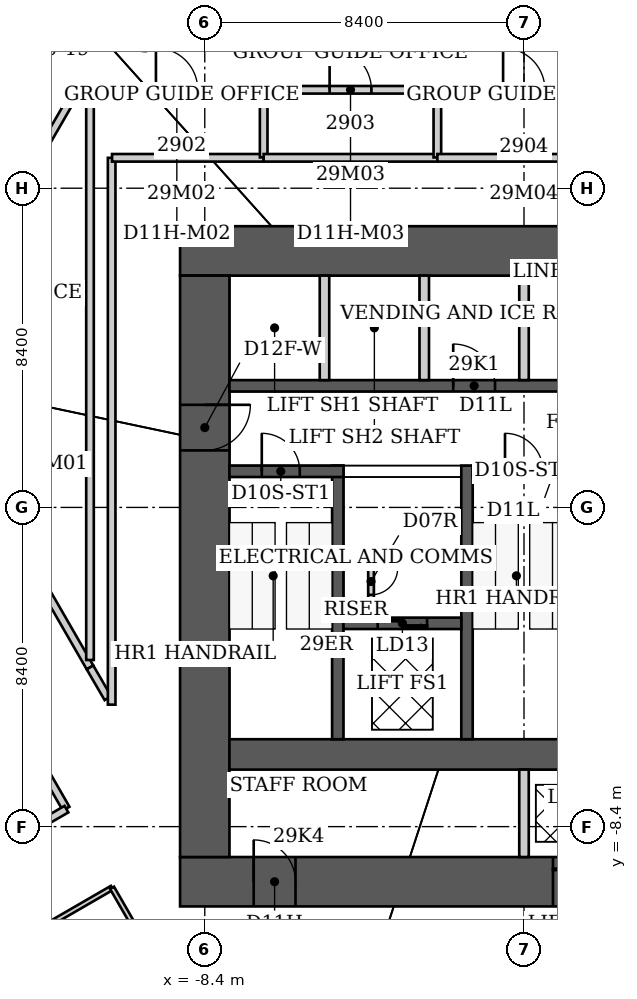
"""IFC4 building model, lengths in metres.
Left out: names, types, materials, properties, quantities, classifications, styles, units other than length and angle.
Written with IfcOpenShell. Run it as: python <this file> out.ifc"""

import sys

from ifc_helpers import new_model, si_unit, direction, frame, frame_2d, origin, place, context, subcontext, project, spatial, rectangle, extrude, element, fill, save


model = new_model("IFC4")
c1 = context("Model", 3, precision=1e-05, world=origin(), true_north=direction((0.0, 1.0)))
c2 = subcontext(c1, "Body", "Model", "MODEL_VIEW")
j1 = project(units=[si_unit("LENGTHUNIT", "METRE"), si_unit("PLANEANGLEUNIT", "RADIAN")], contexts=[c1])
p1 = place(None, origin())
s1 = spatial("IfcSite", under=j1, at=p1, CompositionType="ELEMENT")
p2 = place(p1, origin())
s2 = spatial("IfcBuilding", under=s1, at=p2, CompositionType="ELEMENT")
p3 = place(p2, frame((0.0, 0.0, 119.6)))
s3 = spatial("IfcBuildingStorey", under=s2, at=p3, CompositionType="ELEMENT", Elevation=119.6)
p4 = place(p3, frame((-9.05, 6.75, 0.0), z_axis=(0.0, 0.0, 1.0), x_axis=(1.0, 0.0, 0.0)))
e1 = element("IfcWall", 1, at=p4, inside=s3, PredefinedType="SHEAR", context=c2, shape_type="SweptSolid", body=[
    extrude(rectangle(XDim=18.1, YDim=1.3, at=frame_2d((9.05, 0.0))), origin(), (0.0, 0.0, 1.0), 3.8),
])
p5 = place(p3, frame((-9.05, -9.85, 0.0), z_axis=(0.0, 0.0, 1.0), x_axis=(1.0, 0.0, 0.0)))
e2 = element("IfcWall", 2, at=p5, inside=s3, PredefinedType="SHEAR", context=c2, shape_type="SweptSolid", body=[
    extrude(rectangle(XDim=18.1, YDim=1.3, at=frame_2d((9.05, 0.0))), origin(), (0.0, 0.0, 1.0), 3.8),
])
p6 = place(p5, frame((1.938, 0.0, 0.0)))
e3 = element("IfcOpeningElement", 3, at=p6, cuts=e2, PredefinedType="OPENING", context=c2, shape_type="SweptSolid", body=[
    extrude(rectangle(XDim=1.1, YDim=2.2, at=frame_2d((0.55, 1.1))), frame((0.0, 0.65, 0.0), z_axis=(0.0, -1.0, 0.0), x_axis=(1.0, 0.0, 0.0)), (0.0, 0.0, 1.0), 1.3),
])
p7 = place(p5, frame((9.812, 0.0, 0.0)))
e4 = element("IfcOpeningElement", 4, at=p7, cuts=e2, PredefinedType="OPENING", context=c2, shape_type="SweptSolid", body=[
    extrude(rectangle(XDim=1.1, YDim=2.1, at=frame_2d((0.55, 1.05))), frame((0.0, 0.65, 0.0), z_axis=(0.0, -1.0, 0.0), x_axis=(1.0, 0.0, 0.0)), (0.0, 0.0, 1.0), 1.3),
])
p8 = place(p5, frame((12.438, 0.0, 0.0)))
e5 = element("IfcOpeningElement", 5, at=p8, cuts=e2, PredefinedType="OPENING", context=c2, shape_type="SweptSolid", body=[
    extrude(rectangle(XDim=1.1, YDim=2.1, at=frame_2d((0.55, 1.05))), frame((0.0, 0.65, 0.0), z_axis=(0.0, -1.0, 0.0), x_axis=(1.0, 0.0, 0.0)), (0.0, 0.0, 1.0), 1.3),
])
p9 = place(p5, frame((15.062, 0.0, 0.0)))
e6 = element("IfcOpeningElement", 6, at=p9, cuts=e2, PredefinedType="OPENING", context=c2, shape_type="SweptSolid", body=[
    extrude(rectangle(XDim=1.1, YDim=2.1, at=frame_2d((0.55, 1.05))), frame((0.0, 0.65, 0.0), z_axis=(0.0, -1.0, 0.0), x_axis=(1.0, 0.0, 0.0)), (0.0, 0.0, 1.0), 1.3),
])
p10 = place(p3, frame((-8.4, -9.2, 0.0), z_axis=(0.0, 0.0, 1.0), x_axis=(0.0, 1.0, 0.0)))
e7 = element("IfcWall", 7, at=p10, inside=s3, PredefinedType="SHEAR", context=c2, shape_type="SweptSolid", body=[
    extrude(rectangle(XDim=15.3, YDim=1.3, at=frame_2d((7.65, 0.0))), origin(), (0.0, 0.0, 1.0), 3.8),
])
p11 = place(p10, frame((10.7, 0.0, 0.0)))
e8 = element("IfcOpeningElement", 8, at=p11, cuts=e7, PredefinedType="OPENING", context=c2, shape_type="SweptSolid", body=[
    extrude(rectangle(XDim=1.2, YDim=2.2, at=frame_2d((0.6, 1.1))), frame((0.0, 0.65, 0.0), z_axis=(0.0, -1.0, 0.0), x_axis=(1.0, 0.0, 0.0)), (0.0, 0.0, 1.0), 1.3),
])
p12 = place(p3, frame((-7.75, -6.5, 0.0), z_axis=(0.0, 0.0, 1.0), x_axis=(1.0, 0.0, 0.0)))
e9 = element("IfcWall", 9, at=p12, inside=s3, PredefinedType="SHEAR", context=c2, shape_type="SweptSolid", body=[
    extrude(rectangle(XDim=15.5, YDim=0.8, at=frame_2d((7.75, 0.0))), origin(), (0.0, 0.0, 1.0), 3.8),
])
for number, where, z_axis, x_axis in (
    (10, (-4.9, -6.1, 0.0), (0.0, 0.0, 1.0), (0.0, 1.0, 0.0)),
    (11, (-1.5, -6.1, 0.0), (0.0, 0.0, 1.0), (0.0, 1.0, 0.0)),
):
    element("IfcWall", number, at=place(p3, frame(where, z_axis=z_axis, x_axis=x_axis)), inside=s3, PredefinedType="SHEAR", context=c2, shape_type="SweptSolid", body=[
        extrude(rectangle(XDim=7.2, YDim=0.3, at=frame_2d((3.6, 0.0))), origin(), (0.0, 0.0, 1.0), 3.8),
    ])
p13 = place(p3, frame((-7.75, 0.95, 0.0), z_axis=(0.0, 0.0, 1.0), x_axis=(1.0, 0.0, 0.0)))
e12 = element("IfcWall", 12, at=p13, inside=s3, PredefinedType="SHEAR", context=c2, shape_type="SweptSolid", body=[
    extrude(rectangle(XDim=3.0, YDim=0.3, at=frame_2d((1.5, 0.0))), origin(), (0.0, 0.0, 1.0), 3.8),
])
p14 = place(p13, frame((0.85, 0.0, 0.0)))
e13 = element("IfcOpeningElement", 13, at=p14, cuts=e12, PredefinedType="OPENING", context=c2, shape_type="SweptSolid", body=[
    extrude(rectangle(XDim=1.0, YDim=2.2, at=frame_2d((0.5, 1.1))), frame((0.0, 0.15, 0.0), z_axis=(0.0, -1.0, 0.0), x_axis=(1.0, 0.0, 0.0)), (0.0, 0.0, 1.0), 0.3),
])
p15 = place(p3, frame((-1.35, 0.95, 0.0), z_axis=(0.0, 0.0, 1.0), x_axis=(1.0, 0.0, 0.0)))
e14 = element("IfcWall", 14, at=p15, inside=s3, PredefinedType="SHEAR", context=c2, shape_type="SweptSolid", body=[
    extrude(rectangle(XDim=2.7, YDim=0.3, at=frame_2d((1.35, 0.0))), origin(), (0.0, 0.0, 1.0), 3.8),
])
p16 = place(p15, frame((0.85, 0.0, 0.0)))
e15 = element("IfcOpeningElement", 15, at=p16, cuts=e14, PredefinedType="OPENING", context=c2, shape_type="SweptSolid", body=[
    extrude(rectangle(XDim=1.0, YDim=2.2, at=frame_2d((0.5, 1.1))), frame((0.0, 0.15, 0.0), z_axis=(0.0, -1.0, 0.0), x_axis=(1.0, 0.0, 0.0)), (0.0, 0.0, 1.0), 0.3),
])
p17 = place(p3, frame((-4.75, -3.05, 0.0), z_axis=(0.0, 0.0, 1.0), x_axis=(1.0, 0.0, 0.0)))
e16 = element("IfcWall", 16, at=p17, inside=s3, PredefinedType="SHEAR", context=c2, shape_type="SweptSolid", body=[
    extrude(rectangle(XDim=3.1, YDim=0.3, at=frame_2d((1.55, 0.0))), origin(), (0.0, 0.0, 1.0), 3.8),
])
p18 = place(p17, frame((0.9, 0.0, 0.0)))
e17 = element("IfcOpeningElement", 17, at=p18, cuts=e16, PredefinedType="OPENING", context=c2, shape_type="SweptSolid", body=[
    extrude(rectangle(XDim=1.3, YDim=2.1, at=frame_2d((0.65, 1.05))), frame((0.0, 0.15, 0.0), z_axis=(0.0, -1.0, 0.0), x_axis=(1.0, 0.0, 0.0)), (0.0, 0.0, 1.0), 0.3),
])
p19 = place(p3, frame((-7.75, 3.2, 0.0), z_axis=(0.0, 0.0, 1.0), x_axis=(1.0, 0.0, 0.0)))
e18 = element("IfcWall", 18, at=p19, inside=s3, PredefinedType="SHEAR", context=c2, shape_type="SweptSolid", body=[
    extrude(rectangle(XDim=15.5, YDim=0.3, at=frame_2d((7.75, 0.0))), origin(), (0.0, 0.0, 1.0), 3.8),
])
p20 = place(p19, frame((5.887, 0.0, 0.0)))
e19 = element("IfcOpeningElement", 19, at=p20, cuts=e18, PredefinedType="OPENING", context=c2, shape_type="SweptSolid", body=[
    extrude(rectangle(XDim=1.1, YDim=2.2, at=frame_2d((0.55, 1.1))), frame((0.0, 0.15, 0.0), z_axis=(0.0, -1.0, 0.0), x_axis=(1.0, 0.0, 0.0)), (0.0, 0.0, 1.0), 0.3),
])
p21 = place(p19, frame((8.812, 0.0, 0.0)))
e20 = element("IfcOpeningElement", 20, at=p21, cuts=e18, PredefinedType="OPENING", context=c2, shape_type="SweptSolid", body=[
    extrude(rectangle(XDim=1.1, YDim=2.2, at=frame_2d((0.55, 1.1))), frame((0.0, 0.15, 0.0), z_axis=(0.0, -1.0, 0.0), x_axis=(1.0, 0.0, 0.0)), (0.0, 0.0, 1.0), 0.3),
])
p22 = place(p19, frame((12.7, 0.0, 0.0)))
e21 = element("IfcOpeningElement", 21, at=p22, cuts=e18, PredefinedType="OPENING", context=c2, shape_type="SweptSolid", body=[
    extrude(rectangle(XDim=1.1, YDim=2.2, at=frame_2d((0.55, 1.1))), frame((0.0, 0.15, 0.0), z_axis=(0.0, -1.0, 0.0), x_axis=(1.0, 0.0, 0.0)), (0.0, 0.0, 1.0), 0.3),
])
for number, where, z_axis, x_axis in (
    (22, (-5.25, 3.35, 0.0), (0.0, 0.0, 1.0), (0.0, 1.0, 0.0)),
    (23, (-2.625, 3.35, 0.0), (0.0, 0.0, 1.0), (0.0, 1.0, 0.0)),
    (24, (0.0, 3.35, 0.0), (0.0, 0.0, 1.0), (0.0, 1.0, 0.0)),
):
    element("IfcWall", number, at=place(p3, frame(where, z_axis=z_axis, x_axis=x_axis)), inside=s3, PredefinedType="PARTITIONING", context=c2, shape_type="SweptSolid", body=[
        extrude(rectangle(XDim=2.75, YDim=0.25, at=frame_2d((1.375, 0.0))), origin(), (0.0, 0.0, 1.0), 3.8),
    ])
p23 = place(p3, frame((0.0, -9.2, 0.0), z_axis=(0.0, 0.0, 1.0), x_axis=(0.0, 1.0, 0.0)))
e25 = element("IfcWall", 25, at=p23, inside=s3, PredefinedType="PARTITIONING", context=c2, shape_type="SweptSolid", body=[
    extrude(rectangle(XDim=2.3, YDim=0.25, at=frame_2d((1.15, 0.0))), origin(), (0.0, 0.0, 1.0), 3.8),
])
p24 = place(p3, frame((-15.98, 3.7, 0.0), z_axis=(0.0, 0.0, 1.0), x_axis=(0.500093981358, 0.865971136822, 0.0)))
e26 = element("IfcWall", 26, at=p24, inside=s3, PredefinedType="PARTITIONING", context=c2, shape_type="SweptSolid", body=[
    extrude(rectangle(XDim=8.418, YDim=0.2, at=frame_2d((4.209, 0.0))), origin(), (0.0, 0.0, 1.0), 3.64),
])
p25 = place(p3, frame((-14.32, -3.98, 0.0), z_axis=(0.0, 0.0, 1.0), x_axis=(0.49899372311, -0.866605599046, 0.0)))
e27 = element("IfcWall", 27, at=p25, inside=s3, PredefinedType="PARTITIONING", context=c2, shape_type="SweptSolid", body=[
    extrude(rectangle(XDim=4.555, YDim=0.2, at=frame_2d((2.277, 0.0))), origin(), (0.0, 0.0, 1.0), 3.64),
])
p26 = place(p3, frame((-12.81, -11.15, 0.0), z_axis=(0.0, 0.0, 1.0), x_axis=(0.865543766642, 0.500833293649, 0.0)))
e28 = element("IfcWall", 28, at=p26, inside=s3, PredefinedType="PARTITIONING", context=c2, shape_type="SweptSolid", body=[
    extrude(rectangle(XDim=2.276, YDim=0.12, at=frame_2d((1.138, 0.0))), origin(), (0.0, 0.0, 1.0), 3.64),
])
p27 = place(p3, frame((-12.04, -7.94, 0.0), z_axis=(0.0, 0.0, 1.0), x_axis=(-0.86587701925, -0.500256921525, 0.0)))
e29 = element("IfcWall", 29, at=p27, inside=s3, PredefinedType="PARTITIONING", context=c2, shape_type="SweptSolid", body=[
    extrude(rectangle(XDim=8.066, YDim=0.2, at=frame_2d((4.033, 0.0))), origin(), (0.0, 0.0, 1.0), 3.64),
])
p28 = place(p27, frame((3.533, 0.0, 0.0)))
e30 = element("IfcOpeningElement", 30, at=p28, cuts=e29, PredefinedType="OPENING", context=c2, shape_type="SweptSolid", body=[
    extrude(rectangle(XDim=1.0, YDim=2.13, at=frame_2d((0.5, 1.065))), frame((0.0, 0.1, 0.0), z_axis=(0.0, -1.0, 0.0), x_axis=(1.0, 0.0, 0.0)), (0.0, 0.0, 1.0), 0.2),
])
p29 = place(p3, frame((-11.77, 10.99, 0.0), z_axis=(0.0, 0.0, 1.0), x_axis=(1.0, 0.0, 0.0)))
e31 = element("IfcWall", 31, at=p29, inside=s3, PredefinedType="PARTITIONING", context=c2, shape_type="SweptSolid", body=[
    extrude(rectangle(XDim=0.35, YDim=0.2, at=frame_2d((0.175, 0.0))), origin(), (0.0, 0.0, 1.0), 3.64),
])
p30 = place(p3, frame((-11.42, -4.21, 0.0), z_axis=(0.0, 0.0, 1.0), x_axis=(-0.499446957289, 0.866344467781, 0.0)))
e32 = element("IfcWall", 32, at=p30, inside=s3, PredefinedType="PARTITIONING", context=c2, shape_type="SweptSolid", body=[
    extrude(rectangle(XDim=9.13, YDim=0.2, at=frame_2d((4.565, 0.0))), origin(), (0.0, 0.0, 1.0), 3.64),
])
p31 = place(p30, frame((4.015, 0.0, 0.0)))
e33 = element("IfcOpeningElement", 33, at=p31, cuts=e32, PredefinedType="OPENING", context=c2, shape_type="SweptSolid", body=[
    extrude(rectangle(XDim=1.1, YDim=2.2, at=frame_2d((0.55, 1.1))), frame((0.0, 0.1, 0.0), z_axis=(0.0, -1.0, 0.0), x_axis=(1.0, 0.0, 0.0)), (0.0, 0.0, 1.0), 0.2),
])
p32 = place(p3, frame((-11.42, 10.98, 0.0), z_axis=(0.0, 0.0, 1.0), x_axis=(0.0, -1.0, 0.0)))
e34 = element("IfcWall", 34, at=p32, inside=s3, PredefinedType="PARTITIONING", context=c2, shape_type="SweptSolid", body=[
    extrude(rectangle(XDim=14.995, YDim=0.2, at=frame_2d((7.498, 0.0))), origin(), (0.0, 0.0, 1.0), 3.64),
])
p33 = place(p3, frame((-11.42, 10.99, 0.0), z_axis=(0.0, 0.0, 1.0), x_axis=(1.0, 0.0, 0.0)))
e35 = element("IfcWall", 35, at=p33, inside=s3, PredefinedType="PARTITIONING", context=c2, shape_type="SweptSolid", body=[
    extrude(rectangle(XDim=4.57, YDim=0.2, at=frame_2d((2.285, 0.0))), origin(), (0.0, 0.0, 1.0), 3.64),
])
p34 = place(p33, frame((1.735, 0.0, 0.0)))
e36 = element("IfcOpeningElement", 36, at=p34, cuts=e35, PredefinedType="OPENING", context=c2, shape_type="SweptSolid", body=[
    extrude(rectangle(XDim=1.1, YDim=2.2, at=frame_2d((0.55, 1.1))), frame((0.0, 0.1, 0.0), z_axis=(0.0, -1.0, 0.0), x_axis=(1.0, 0.0, 0.0)), (0.0, 0.0, 1.0), 0.2),
])
p35 = place(p3, frame((-10.948, -5.021, 0.0), z_axis=(0.0, 0.0, 1.0), x_axis=(-0.502706337432, 0.86445725071, 0.0)))
e37 = element("IfcWall", 37, at=p35, inside=s3, PredefinedType="PARTITIONING", context=c2, shape_type="SweptSolid", body=[
    extrude(rectangle(XDim=0.939, YDim=0.2, at=frame_2d((0.469, 0.0))), origin(), (0.0, 0.0, 1.0), 3.64),
])
p36 = place(p3, frame((-10.85, 9.2, 0.0), z_axis=(0.0, 0.0, 1.0), x_axis=(0.0, -1.0, 0.0)))
e38 = element("IfcWall", 38, at=p36, inside=s3, PredefinedType="PARTITIONING", context=c2, shape_type="SweptSolid", body=[
    extrude(rectangle(XDim=14.39, YDim=0.2, at=frame_2d((7.195, 0.0))), origin(), (0.0, 0.0, 1.0), 3.64),
])
p37 = place(p3, frame((-10.84, -10.01, 0.0), z_axis=(0.0, 0.0, 1.0), x_axis=(0.500089055364, -0.86597398154, 0.0)))
e39 = element("IfcWall", 39, at=p37, inside=s3, PredefinedType="PARTITIONING", context=c2, shape_type="SweptSolid", body=[
    extrude(rectangle(XDim=2.459, YDim=0.12, at=frame_2d((1.23, 0.0))), origin(), (0.0, 0.0, 1.0), 3.64),
])
p38 = place(p3, frame((-6.85, 9.2, 0.0), z_axis=(0.0, 0.0, 1.0), x_axis=(-1.0, 0.0, 0.0)))
e40 = element("IfcWall", 40, at=p38, inside=s3, PredefinedType="PARTITIONING", context=c2, shape_type="SweptSolid", body=[
    extrude(rectangle(XDim=3.99, YDim=0.2, at=frame_2d((1.995, 0.0))), origin(), (0.0, 0.0, 1.0), 3.64),
])
p39 = place(p3, frame((-6.85, 10.98, 0.0), z_axis=(0.0, 0.0, 1.0), x_axis=(0.0, -1.0, 0.0)))
e41 = element("IfcWall", 41, at=p39, inside=s3, PredefinedType="PARTITIONING", context=c2, shape_type="SweptSolid", body=[
    extrude(rectangle(XDim=1.77, YDim=0.2, at=frame_2d((0.885, 0.0))), origin(), (0.0, 0.0, 1.0), 3.64),
])
p40 = place(p3, frame((-6.85, 10.99, 0.0), z_axis=(0.0, 0.0, 1.0), x_axis=(1.0, 0.0, 0.0)))
e42 = element("IfcWall", 42, at=p40, inside=s3, PredefinedType="PARTITIONING", context=c2, shape_type="SweptSolid", body=[
    extrude(rectangle(XDim=4.57, YDim=0.2, at=frame_2d((2.285, 0.0))), origin(), (0.0, 0.0, 1.0), 3.64),
])
p41 = place(p40, frame((1.735, 0.0, 0.0)))
e43 = element("IfcOpeningElement", 43, at=p41, cuts=e42, PredefinedType="OPENING", context=c2, shape_type="SweptSolid", body=[
    extrude(rectangle(XDim=1.1, YDim=2.2, at=frame_2d((0.55, 1.1))), frame((0.0, 0.1, 0.0), z_axis=(0.0, -1.0, 0.0), x_axis=(1.0, 0.0, 0.0)), (0.0, 0.0, 1.0), 0.2),
])
p42 = place(p3, frame((-2.28, 9.2, 0.0), z_axis=(0.0, 0.0, 1.0), x_axis=(-1.0, 0.0, 0.0)))
e44 = element("IfcWall", 44, at=p42, inside=s3, PredefinedType="PARTITIONING", context=c2, shape_type="SweptSolid", body=[
    extrude(rectangle(XDim=4.57, YDim=0.2, at=frame_2d((2.285, 0.0))), origin(), (0.0, 0.0, 1.0), 3.64),
])
p43 = place(p3, frame((-2.28, 10.98, 0.0), z_axis=(0.0, 0.0, 1.0), x_axis=(0.0, -1.0, 0.0)))
e45 = element("IfcWall", 45, at=p43, inside=s3, PredefinedType="PARTITIONING", context=c2, shape_type="SweptSolid", body=[
    extrude(rectangle(XDim=1.77, YDim=0.2, at=frame_2d((0.885, 0.0))), origin(), (0.0, 0.0, 1.0), 3.64),
])
p44 = place(p3, frame((-2.28, 10.99, 0.0), z_axis=(0.0, 0.0, 1.0), x_axis=(1.0, 0.0, 0.0)))
e46 = element("IfcWall", 46, at=p44, inside=s3, PredefinedType="PARTITIONING", context=c2, shape_type="SweptSolid", body=[
    extrude(rectangle(XDim=4.56, YDim=0.2, at=frame_2d((2.28, 0.0))), origin(), (0.0, 0.0, 1.0), 3.64),
])
p45 = place(p44, frame((1.73, 0.0, 0.0)))
e47 = element("IfcOpeningElement", 47, at=p45, cuts=e46, PredefinedType="OPENING", context=c2, shape_type="SweptSolid", body=[
    extrude(rectangle(XDim=1.1, YDim=2.2, at=frame_2d((0.55, 1.1))), frame((0.0, 0.1, 0.0), z_axis=(0.0, -1.0, 0.0), x_axis=(1.0, 0.0, 0.0)), (0.0, 0.0, 1.0), 0.2),
])
p46 = place(p3, frame((2.28, 9.2, 0.0), z_axis=(0.0, 0.0, 1.0), x_axis=(-1.0, 0.0, 0.0)))
e48 = element("IfcWall", 48, at=p46, inside=s3, PredefinedType="PARTITIONING", context=c2, shape_type="SweptSolid", body=[
    extrude(rectangle(XDim=4.56, YDim=0.2, at=frame_2d((2.28, 0.0))), origin(), (0.0, 0.0, 1.0), 3.64),
])
p47 = place(p3, frame((-4.025, -2.9, 0.0), z_axis=(0.0, 0.0, 1.0), x_axis=(0.0, 1.0, 0.0)))
e49 = element("IfcWall", 49, at=p47, inside=s3, PredefinedType="PARTITIONING", context=c2, shape_type="SweptSolid", body=[
    extrude(rectangle(XDim=1.775, YDim=0.15, at=frame_2d((0.887, 0.0))), origin(), (0.0, 0.0, 1.0), 3.64),
])
p48 = place(p47, frame((0.6, 0.0, 0.0)))
e50 = element("IfcOpeningElement", 50, at=p48, cuts=e49, PredefinedType="OPENING", context=c2, shape_type="SweptSolid", body=[
    extrude(rectangle(XDim=0.7, YDim=2.1, at=frame_2d((0.35, 1.05))), frame((0.0, 0.075, 0.0), z_axis=(0.0, -1.0, 0.0), x_axis=(1.0, 0.0, 0.0)), (0.0, 0.0, 1.0), 0.15),
])
p49 = place(p3, frame((-4.75, -1.2, 0.0), z_axis=(0.0, 0.0, 1.0), x_axis=(1.0, 0.0, 0.0)))
e51 = element("IfcWall", 51, at=p49, inside=s3, PredefinedType="PARTITIONING", context=c2, shape_type="SweptSolid", body=[
    extrude(rectangle(XDim=0.8, YDim=0.15, at=frame_2d((0.4, 0.0))), origin(), (0.0, 0.0, 1.0), 3.64),
])
p50 = place(p34, origin())
e52 = element("IfcDoor", 52, at=p50, inside=s3, OperationType="SINGLE_SWING_LEFT", PredefinedType="DOOR", context=c2, shape_type="SweptSolid", body=[
    extrude(rectangle(XDim=1.1, YDim=2.2, at=frame_2d((0.55, 1.1))), frame((0.0, 0.025, 0.0), z_axis=(0.0, -1.0, 0.0), x_axis=(1.0, 0.0, 0.0)), (0.0, 0.0, 1.0), 0.05),
])
fill(e36, e52)
p51 = place(p41, origin())
e53 = element("IfcDoor", 53, at=p51, inside=s3, OperationType="SINGLE_SWING_LEFT", PredefinedType="DOOR", context=c2, shape_type="SweptSolid", body=[
    extrude(rectangle(XDim=1.1, YDim=2.2, at=frame_2d((0.55, 1.1))), frame((0.0, 0.025, 0.0), z_axis=(0.0, -1.0, 0.0), x_axis=(1.0, 0.0, 0.0)), (0.0, 0.0, 1.0), 0.05),
])
fill(e43, e53)
p52 = place(p45, origin())
e54 = element("IfcDoor", 54, at=p52, inside=s3, OperationType="SINGLE_SWING_LEFT", PredefinedType="DOOR", context=c2, shape_type="SweptSolid", body=[
    extrude(rectangle(XDim=1.1, YDim=2.2, at=frame_2d((0.55, 1.1))), frame((0.0, 0.025, 0.0), z_axis=(0.0, -1.0, 0.0), x_axis=(1.0, 0.0, 0.0)), (0.0, 0.0, 1.0), 0.05),
])
fill(e47, e54)
p53 = place(p14, origin())
e55 = element("IfcDoor", 55, at=p53, inside=s3, OperationType="SINGLE_SWING_LEFT", PredefinedType="DOOR", context=c2, shape_type="SweptSolid", body=[
    extrude(rectangle(XDim=1.0, YDim=2.2, at=frame_2d((0.5, 1.1))), frame((0.0, 0.025, 0.0), z_axis=(0.0, -1.0, 0.0), x_axis=(1.0, 0.0, 0.0)), (0.0, 0.0, 1.0), 0.05),
])
fill(e13, e55)
p54 = place(p16, origin())
e56 = element("IfcDoor", 56, at=p54, inside=s3, OperationType="SINGLE_SWING_LEFT", PredefinedType="DOOR", context=c2, shape_type="SweptSolid", body=[
    extrude(rectangle(XDim=1.0, YDim=2.2, at=frame_2d((0.5, 1.1))), frame((0.0, 0.025, 0.0), z_axis=(0.0, -1.0, 0.0), x_axis=(1.0, 0.0, 0.0)), (0.0, 0.0, 1.0), 0.05),
])
fill(e15, e56)
p55 = place(p11, origin())
e57 = element("IfcDoor", 57, at=p55, inside=s3, OperationType="SINGLE_SWING_RIGHT", PredefinedType="DOOR", context=c2, shape_type="SweptSolid", body=[
    extrude(rectangle(XDim=1.2, YDim=2.2, at=frame_2d((0.6, 1.1))), frame((0.0, 0.025, 0.0), z_axis=(0.0, -1.0, 0.0), x_axis=(1.0, 0.0, 0.0)), (0.0, 0.0, 1.0), 0.05),
])
fill(e8, e57)
p56 = place(p48, origin())
e58 = element("IfcDoor", 58, at=p56, inside=s3, OperationType="SINGLE_SWING_RIGHT", PredefinedType="DOOR", context=c2, shape_type="SweptSolid", body=[
    extrude(rectangle(XDim=0.7, YDim=2.1, at=frame_2d((0.35, 1.05))), frame((0.0, 0.025, 0.0), z_axis=(0.0, -1.0, 0.0), x_axis=(1.0, 0.0, 0.0)), (0.0, 0.0, 1.0), 0.05),
])
fill(e50, e58)
p57 = place(p20, origin())
e59 = element("IfcDoor", 59, at=p57, inside=s3, OperationType="SINGLE_SWING_LEFT", PredefinedType="DOOR", context=c2, shape_type="SweptSolid", body=[
    extrude(rectangle(XDim=1.1, YDim=2.2, at=frame_2d((0.55, 1.1))), frame((0.0, 0.025, 0.0), z_axis=(0.0, -1.0, 0.0), x_axis=(1.0, 0.0, 0.0)), (0.0, 0.0, 1.0), 0.05),
])
fill(e19, e59)
p58 = place(p6, origin())
e60 = element("IfcDoor", 60, at=p58, inside=s3, OperationType="SINGLE_SWING_LEFT", PredefinedType="DOOR", context=c2, shape_type="SweptSolid", body=[
    extrude(rectangle(XDim=1.1, YDim=2.2, at=frame_2d((0.55, 1.1))), frame((0.0, 0.025, 0.0), z_axis=(0.0, -1.0, 0.0), x_axis=(1.0, 0.0, 0.0)), (0.0, 0.0, 1.0), 0.05),
])
fill(e3, e60)
p59 = place(p7, origin())
e61 = element("IfcDoor", 61, at=p59, inside=s3, OperationType="DOUBLE_DOOR_SLIDING", PredefinedType="DOOR", context=c2, shape_type="SweptSolid", body=[
    extrude(rectangle(XDim=1.1, YDim=2.1, at=frame_2d((0.55, 1.05))), frame((0.0, 0.025, 0.0), z_axis=(0.0, -1.0, 0.0), x_axis=(1.0, 0.0, 0.0)), (0.0, 0.0, 1.0), 0.05),
])
fill(e4, e61)
p60 = place(p18, origin())
e62 = element("IfcDoor", 62, at=p60, inside=s3, OperationType="DOUBLE_DOOR_SLIDING", PredefinedType="DOOR", context=c2, shape_type="SweptSolid", body=[
    extrude(rectangle(XDim=1.3, YDim=2.1, at=frame_2d((0.65, 1.05))), frame((0.0, 0.025, 0.0), z_axis=(0.0, -1.0, 0.0), x_axis=(1.0, 0.0, 0.0)), (0.0, 0.0, 1.0), 0.05),
])
fill(e17, e62)
save(model, sys.argv[1])
